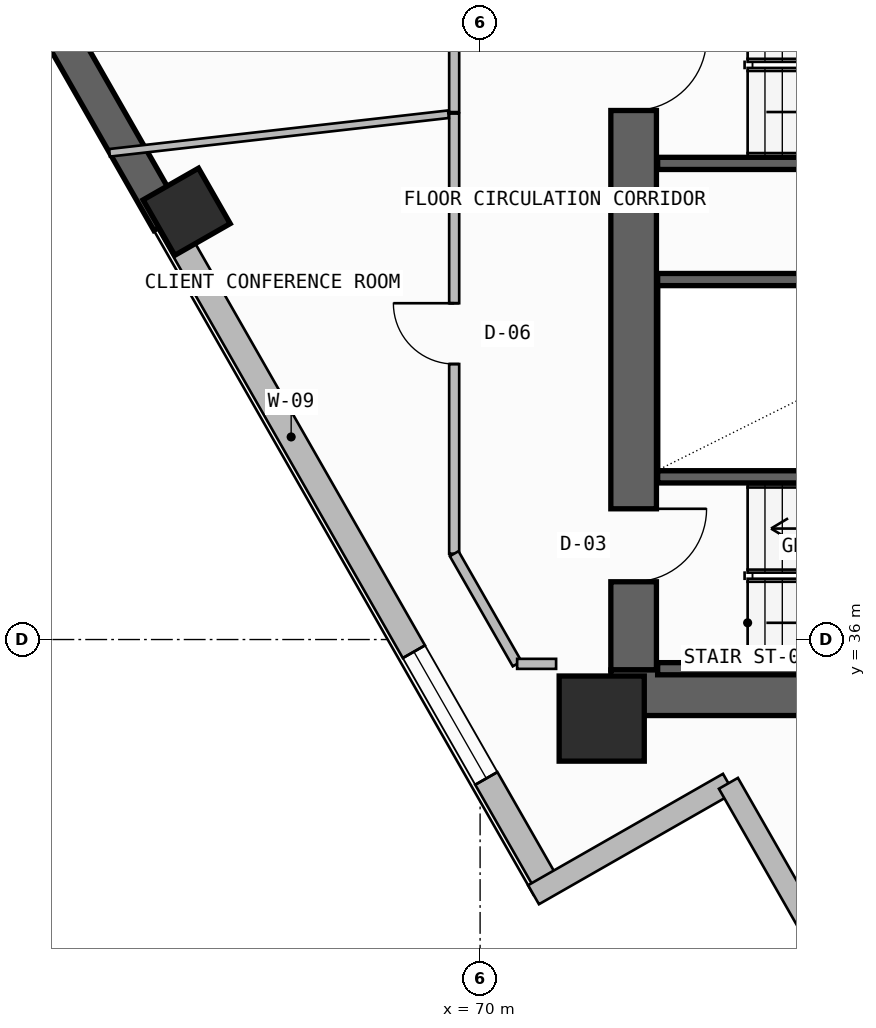
"""IFC4 building model, lengths in metres.
Left out: names, types, materials, properties, quantities, classifications, styles, units other than length and angle.
Written with IfcOpenShell. Run it as: python <this file> out.ifc"""

import sys

from ifc_helpers import new_model, si_unit, direction, frame, frame_2d, origin, origin_2d, place, context, subcontext, project, spatial, rectangle, extrude, element, fill, save


model = new_model("IFC4")
c1 = context("Model", 3, precision=1e-05, world=origin(), true_north=direction((0.0, 1.0)))
c2 = subcontext(c1, "Body", "Model", "MODEL_VIEW")
j1 = project(units=[si_unit("LENGTHUNIT", "METRE"), si_unit("PLANEANGLEUNIT", "RADIAN")], contexts=[c1])
p1 = place(None, origin())
s1 = spatial("IfcSite", under=j1, at=p1, CompositionType="ELEMENT")
p2 = place(p1, origin())
s2 = spatial("IfcBuilding", under=s1, at=p2, CompositionType="ELEMENT")
p3 = place(p2, frame((0.0, 0.0, 229.06)))
s3 = spatial("IfcBuildingStorey", under=s2, at=p3, CompositionType="ELEMENT", Elevation=229.06)
p4 = place(p3, frame((72.525, 35.5, -0.26), z_axis=(0.0, 0.0, 1.0), x_axis=(0.0, 1.0, 0.0)))
e1 = element("IfcWall", 1, at=p4, inside=s3, PredefinedType="SHEAR", context=c2, shape_type="SweptSolid", body=[
    extrude(rectangle(XDim=7.85, YDim=0.75, at=frame_2d((3.925, 0.0))), origin(), (0.0, 0.0, 1.0), 3.52),
])
p5 = place(p4, frame((1.45, 0.0, 0.26)))
e2 = element("IfcOpeningElement", 2, at=p5, cuts=e1, PredefinedType="OPENING", context=c2, shape_type="SweptSolid", body=[
    extrude(rectangle(XDim=1.2, YDim=2.2, at=frame_2d((0.6, 1.1))), frame((0.0, 0.385, 0.0), z_axis=(0.0, -1.0, 0.0), x_axis=(1.0, 0.0, 0.0)), (0.0, 0.0, 1.0), 0.77),
])
p6 = place(p3, frame((72.15, 35.125, -0.26), z_axis=(0.0, 0.0, 1.0), x_axis=(1.0, 0.0, 0.0)))
e3 = element("IfcWall", 3, at=p6, inside=s3, PredefinedType="SHEAR", context=c2, shape_type="SweptSolid", body=[
    extrude(rectangle(XDim=13.6, YDim=0.75, at=frame_2d((6.8, 0.0))), origin(), (0.0, 0.0, 1.0), 3.52),
])
p7 = place(p3, frame((72.525, 43.35, -0.26), z_axis=(0.0, 0.0, 1.0), x_axis=(0.0, 1.0, 0.0)))
e4 = element("IfcWall", 4, at=p7, inside=s3, PredefinedType="SHEAR", context=c2, shape_type="SweptSolid", body=[
    extrude(rectangle(XDim=12.7, YDim=0.75, at=frame_2d((6.35, 0.0))), origin(), (0.0, 0.0, 1.0), 3.52),
])
p8 = place(p7, frame((1.35, 0.0, 0.26)))
e5 = element("IfcOpeningElement", 5, at=p8, cuts=e4, PredefinedType="OPENING", context=c2, shape_type="SweptSolid", body=[
    extrude(rectangle(XDim=1.2, YDim=2.2, at=frame_2d((0.6, 1.1))), frame((0.0, 0.385, 0.0), z_axis=(0.0, -1.0, 0.0), x_axis=(1.0, 0.0, 0.0)), (0.0, 0.0, 1.0), 0.77),
])
p9 = place(p3, frame((72.0, 34.7, 0.0), z_axis=(0.0, 0.0, 1.0), x_axis=(1.0, 0.0, 0.0)))
e6 = element("IfcColumn", 6, at=p9, inside=s3, PredefinedType="COLUMN", context=c2, shape_type="SweptSolid", body=[
    extrude(rectangle(XDim=1.4, YDim=1.4, at=origin_2d()), origin(), (0.0, 0.0, 1.0), 3.52),
])
p10 = place(p3, frame((65.173, 43.035, 0.0), z_axis=(0.0, 0.0, 1.0), x_axis=(-0.496216503675, 0.868198814489, 0.0)))
e7 = element("IfcColumn", 7, at=p10, inside=s3, PredefinedType="COLUMN", context=c2, shape_type="SweptSolid", body=[
    extrude(rectangle(XDim=1.05, YDim=1.05, at=origin_2d()), origin(), (0.0, 0.0, 1.0), 3.52),
])
p11 = place(p3, frame((55.325, 59.57, -0.26), z_axis=(0.0, 0.0, 1.0), x_axis=(0.496211351597, -0.868201759124, 0.0)))
e8 = element("IfcWall", 8, at=p11, inside=s3, PredefinedType="SHEAR", context=c2, shape_type="SweptSolid", body=[
    extrude(rectangle(XDim=19.243, YDim=0.55, at=frame_2d((9.622, 0.0))), origin(), (0.0, 0.0, 1.0), 3.52),
])
p12 = place(p3, frame((64.874, 42.864, 0.0), z_axis=(0.0, 0.0, 1.0), x_axis=(0.49622043329, -0.868196568517, 0.0)))
e9 = element("IfcWall", 9, at=p12, inside=s3, PredefinedType="SOLIDWALL", context=c2, shape_type="SweptSolid", body=[
    extrude(rectangle(XDim=12.582, YDim=0.42, at=frame_2d((6.291, 0.0))), origin(), (0.0, 0.0, 1.0), 2.237),
])
p13 = place(p12, frame((8.136, 0.0, 0.957)))
e10 = element("IfcOpeningElement", 10, at=p13, cuts=e9, PredefinedType="OPENING", context=c2, shape_type="SweptSolid", body=[
    extrude(rectangle(XDim=2.4, YDim=1.2, at=frame_2d((1.2, 0.6))), frame((0.0, 0.22, 0.0), z_axis=(0.0, -1.0, 0.0), x_axis=(1.0, 0.0, 0.0)), (0.0, 0.0, 1.0), 0.44),
])
for number, where, z_axis, x_axis in (
    (11, (70.878, 31.803, 0.0), (0.0, 0.0, 1.0), (0.868, 0.496, 0.0)),
    (12, (74.084, 33.635, 0.0), (0.0, 0.0, 1.0), (0.496, -0.868, 0.0)),
):
    element("IfcWall", number, at=place(p3, frame(where, z_axis=z_axis, x_axis=x_axis)), inside=s3, PredefinedType="SOLIDWALL", context=c2, shape_type="SweptSolid", body=[
        extrude(rectangle(XDim=3.692, YDim=0.36, at=frame_2d((1.846, 0.0))), origin(), (0.0, 0.0, 1.0), 3.26),
    ])
for number, where, z_axis, x_axis in (
    (13, (72.92, 35.52, -0.26), (0.0, 0.0, 1.0), (1.0, 0.0, 0.0)),
    (14, (72.92, 38.675, -0.26), (0.0, 0.0, 1.0), (1.0, 0.0, 0.0)),
):
    element("IfcWall", number, at=place(p3, frame(where, z_axis=z_axis, x_axis=x_axis)), inside=s3, PredefinedType="SOLIDWALL", context=c2, shape_type="SweptSolid", body=[
        extrude(rectangle(XDim=7.7, YDim=0.2, at=frame_2d((3.85, 0.0))), origin(), (0.0, 0.0, 1.0), 3.52),
    ])
p14 = place(p3, frame((72.92, 41.92, -0.26), z_axis=(0.0, 0.0, 1.0), x_axis=(1.0, 0.0, 0.0)))
e15 = element("IfcWall", 15, at=p14, inside=s3, PredefinedType="SOLIDWALL", context=c2, shape_type="SweptSolid", body=[
    extrude(rectangle(XDim=7.58, YDim=0.2, at=frame_2d((3.79, 0.0))), origin(), (0.0, 0.0, 1.0), 3.52),
])
p15 = place(p3, frame((72.92, 43.83, -0.26), z_axis=(0.0, 0.0, 1.0), x_axis=(1.0, 0.0, 0.0)))
e16 = element("IfcWall", 16, at=p15, inside=s3, PredefinedType="SOLIDWALL", context=c2, shape_type="SweptSolid", body=[
    extrude(rectangle(XDim=7.7, YDim=0.2, at=frame_2d((3.85, 0.0))), origin(), (0.0, 0.0, 1.0), 3.52),
])
p16 = place(p3, frame((69.573, 44.65, 0.0), z_axis=(0.0, 0.0, 1.0), x_axis=(0.0, -1.0, 0.0)))
e17 = element("IfcWall", 17, at=p16, inside=s3, PredefinedType="PARTITIONING", context=c2, shape_type="SweptSolid", body=[
    extrude(rectangle(XDim=7.238, YDim=0.165, at=frame_2d((3.619, 0.0))), origin(), (0.0, 0.0, 1.0), 3.26),
])
p17 = place(p16, frame((3.119, 0.0, 0.0)))
e18 = element("IfcOpeningElement", 18, at=p17, cuts=e17, PredefinedType="OPENING", context=c2, shape_type="SweptSolid", body=[
    extrude(rectangle(XDim=1.0, YDim=2.2, at=frame_2d((0.5, 1.1))), frame((0.0, 0.093, 0.0), z_axis=(0.0, -1.0, 0.0), x_axis=(1.0, 0.0, 0.0)), (0.0, 0.0, 1.0), 0.185),
])
p18 = place(p3, frame((69.573, 37.412, 0.0), z_axis=(0.0, 0.0, 1.0), x_axis=(0.496315328589, -0.868142323935, 0.0)))
e19 = element("IfcWall", 19, at=p18, inside=s3, PredefinedType="PARTITIONING", context=c2, shape_type="SweptSolid", body=[
    extrude(rectangle(XDim=2.087, YDim=0.165, at=frame_2d((1.043, 0.0))), origin(), (0.0, 0.0, 1.0), 3.26),
])
p19 = place(p3, frame((70.609, 35.6, 0.0), z_axis=(0.0, 0.0, 1.0), x_axis=(1.0, 0.0, 0.0)))
e20 = element("IfcWall", 20, at=p19, inside=s3, PredefinedType="PARTITIONING", context=c2, shape_type="SweptSolid", body=[
    extrude(rectangle(XDim=0.641, YDim=0.165, at=frame_2d((0.32, 0.0))), origin(), (0.0, 0.0, 1.0), 3.26),
])
p20 = place(p3, frame((63.905, 44.004, 0.0), z_axis=(0.0, 0.0, 1.0), x_axis=(0.993582932181, 0.113105954217, 0.0)))
e21 = element("IfcWall", 21, at=p20, inside=s3, PredefinedType="PARTITIONING", context=c2, shape_type="SweptSolid", body=[
    extrude(rectangle(XDim=5.61, YDim=0.125, at=frame_2d((2.805, 0.0))), origin(), (0.0, 0.0, 1.0), 2.237),
])
p21 = place(p3, frame((69.573, 52.799, 0.0), z_axis=(0.0, 0.0, 1.0), x_axis=(0.0, -1.0, 0.0)))
e22 = element("IfcWall", 22, at=p21, inside=s3, PredefinedType="PARTITIONING", context=c2, shape_type="SweptSolid", body=[
    extrude(rectangle(XDim=8.125, YDim=0.165, at=frame_2d((4.062, 0.0))), origin(), (0.0, 0.0, 1.0), 2.237),
])
p22 = place(p21, frame((3.562, 0.0, 0.0)))
e23 = element("IfcOpeningElement", 23, at=p22, cuts=e22, PredefinedType="OPENING", context=c2, shape_type="SweptSolid", body=[
    extrude(rectangle(XDim=1.0, YDim=2.2, at=frame_2d((0.5, 1.1))), frame((0.0, 0.093, 0.0), z_axis=(0.0, -1.0, 0.0), x_axis=(1.0, 0.0, 0.0)), (0.0, 0.0, 1.0), 0.185),
])
p23 = place(p13, origin())
e24 = element("IfcWindow", 24, at=p23, inside=s3, PartitioningType="SINGLE_PANEL", PredefinedType="WINDOW", context=c2, shape_type="SweptSolid", body=[
    extrude(rectangle(XDim=2.4, YDim=1.2, at=frame_2d((1.2, 0.6))), frame((0.0, 0.03, 0.0), z_axis=(0.0, -1.0, 0.0), x_axis=(1.0, 0.0, 0.0)), (0.0, 0.0, 1.0), 0.06),
])
fill(e10, e24)
p24 = place(p5, frame((1.2, 0.0, 0.0), z_axis=(0.0, 0.0, 1.0), x_axis=(-1.0, 0.0, 0.0)))
e25 = element("IfcDoor", 25, at=p24, inside=s3, OperationType="SINGLE_SWING_LEFT", PredefinedType="USERDEFINED", context=c2, shape_type="SweptSolid", body=[
    extrude(rectangle(XDim=1.2, YDim=2.2, at=frame_2d((0.6, 1.1))), frame((0.0, 0.025, 0.0), z_axis=(0.0, -1.0, 0.0), x_axis=(1.0, 0.0, 0.0)), (0.0, 0.0, 1.0), 0.05),
])
fill(e2, e25)
p25 = place(p8, frame((1.2, 0.0, 0.0), z_axis=(0.0, 0.0, 1.0), x_axis=(-1.0, 0.0, 0.0)))
e26 = element("IfcDoor", 26, at=p25, inside=s3, OperationType="SINGLE_SWING_LEFT", PredefinedType="USERDEFINED", context=c2, shape_type="SweptSolid", body=[
    extrude(rectangle(XDim=1.2, YDim=2.2, at=frame_2d((0.6, 1.1))), frame((0.0, 0.025, 0.0), z_axis=(0.0, -1.0, 0.0), x_axis=(1.0, 0.0, 0.0)), (0.0, 0.0, 1.0), 0.05),
])
fill(e5, e26)
p26 = place(p17, frame((1.0, 0.0, 0.0), z_axis=(0.0, 0.0, 1.0), x_axis=(-1.0, 0.0, 0.0)))
e27 = element("IfcDoor", 27, at=p26, inside=s3, OperationType="SINGLE_SWING_RIGHT", PredefinedType="DOOR", context=c2, shape_type="SweptSolid", body=[
    extrude(rectangle(XDim=1.0, YDim=2.2, at=frame_2d((0.5, 1.1))), frame((0.0, 0.025, 0.0), z_axis=(0.0, -1.0, 0.0), x_axis=(1.0, 0.0, 0.0)), (0.0, 0.0, 1.0), 0.05),
])
fill(e18, e27)
save(model, sys.argv[1])
